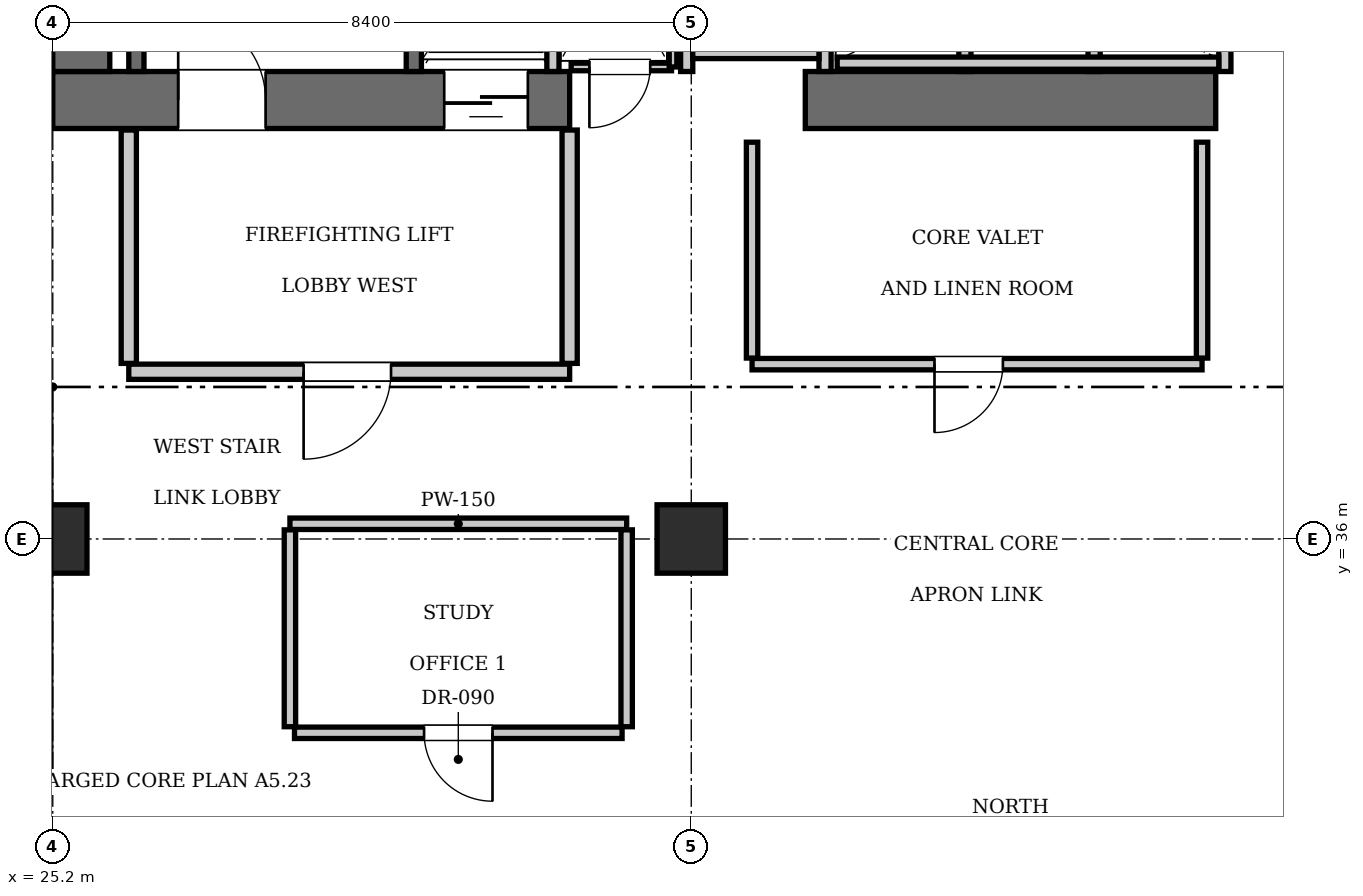
"""IFC4 building model, lengths in metres.
Left out: names, types, materials, properties, quantities, classifications, styles, units other than length and angle.
Written with IfcOpenShell. Run it as: python <this file> out.ifc"""

import sys

from ifc_helpers import new_model, si_unit, direction, frame, frame_2d, origin, origin_2d, place, context, subcontext, project, spatial, rectangle, extrude, element, fill, save


model = new_model("IFC4")
c1 = context("Model", 3, precision=1e-05, world=origin(), true_north=direction((0.0, 1.0)))
c2 = subcontext(c1, "Body", "Model", "MODEL_VIEW")
j1 = project(units=[si_unit("LENGTHUNIT", "METRE"), si_unit("PLANEANGLEUNIT", "RADIAN")], contexts=[c1])
p1 = place(None, origin())
s1 = spatial("IfcSite", under=j1, at=p1, CompositionType="ELEMENT")
p2 = place(p1, origin())
s2 = spatial("IfcBuilding", under=s1, at=p2, CompositionType="ELEMENT")
p3 = place(p2, frame((0.0, 0.0, 150.5)))
s3 = spatial("IfcBuildingStorey", under=s2, at=p3, CompositionType="ELEMENT", Elevation=150.5)
p4 = place(p3, frame((25.2, 41.775, 0.0), z_axis=(0.0, 0.0, 1.0), x_axis=(1.0, 0.0, 0.0)))
e1 = element("IfcWall", 1, at=p4, inside=s3, PredefinedType="SHEAR", context=c2, shape_type="SweptSolid", body=[
    extrude(rectangle(XDim=6.8, YDim=0.75, at=frame_2d((3.4, 0.0))), origin(), (0.0, 0.0, 1.0), 3.85),
])
p5 = place(p4, frame((1.65, 0.0, 0.0)))
e2 = element("IfcOpeningElement", 2, at=p5, cuts=e1, PredefinedType="OPENING", context=c2, shape_type="SweptSolid", body=[
    extrude(rectangle(XDim=1.15, YDim=2.15, at=frame_2d((0.575, 1.075))), frame((0.0, 0.385, 0.0), z_axis=(0.0, -1.0, 0.0), x_axis=(1.0, 0.0, 0.0)), (0.0, 0.0, 1.0), 0.77),
])
p6 = place(p4, frame((5.15, 0.0, 0.0)))
e3 = element("IfcOpeningElement", 3, at=p6, cuts=e1, PredefinedType="OPENING", context=c2, shape_type="SweptSolid", body=[
    extrude(rectangle(XDim=1.1, YDim=2.2, at=frame_2d((0.55, 1.1))), frame((0.0, 0.385, 0.0), z_axis=(0.0, -1.0, 0.0), x_axis=(1.0, 0.0, 0.0)), (0.0, 0.0, 1.0), 0.77),
])
p7 = place(p3, frame((35.1, 41.775, 0.0), z_axis=(0.0, 0.0, 1.0), x_axis=(1.0, 0.0, 0.0)))
e4 = element("IfcWall", 4, at=p7, inside=s3, PredefinedType="SHEAR", context=c2, shape_type="SweptSolid", body=[
    extrude(rectangle(XDim=5.4, YDim=0.75, at=frame_2d((2.7, 0.0))), origin(), (0.0, 0.0, 1.0), 3.85),
])
p8 = place(p3, frame((25.575, 42.15, 0.0), z_axis=(0.0, 0.0, 1.0), x_axis=(0.0, 1.0, 0.0)))
e5 = element("IfcWall", 5, at=p8, inside=s3, PredefinedType="SHEAR", context=c2, shape_type="SweptSolid", body=[
    extrude(rectangle(XDim=1.9, YDim=0.75, at=frame_2d((0.95, 0.0))), origin(), (0.0, 0.0, 1.0), 3.85),
])
for number, where, z_axis, x_axis in (
    (6, (25.2, 36.0, 0.0), (0.0, 0.0, 1.0), (1.0, 0.0, 0.0)),
    (7, (33.6, 36.0, 0.0), (0.0, 0.0, 1.0), (1.0, 0.0, 0.0)),
):
    element("IfcColumn", number, at=place(p3, frame(where, z_axis=z_axis, x_axis=x_axis)), inside=s3, PredefinedType="COLUMN", context=c2, shape_type="SweptSolid", body=[
        extrude(rectangle(XDim=0.9, YDim=0.9, at=origin_2d()), origin(), (0.0, 0.0, 1.0), 3.85),
    ])
p9 = place(p3, frame((29.95, 42.15, 0.0), z_axis=(0.0, 0.0, 1.0), x_axis=(0.0, 1.0, 0.0)))
e8 = element("IfcWall", 8, at=p9, inside=s3, PredefinedType="SOLIDWALL", context=c2, shape_type="SweptSolid", body=[
    extrude(rectangle(XDim=9.0, YDim=0.2, at=frame_2d((4.5, 0.0))), origin(), (0.0, 0.0, 1.0), 3.61),
])
p10 = place(p3, frame((26.3, 42.15, 0.0), z_axis=(0.0, 0.0, 1.0), x_axis=(0.0, 1.0, 0.0)))
e9 = element("IfcWall", 9, at=p10, inside=s3, PredefinedType="SOLIDWALL", context=c2, shape_type="SweptSolid", body=[
    extrude(rectangle(XDim=1.87, YDim=0.2, at=frame_2d((0.935, 0.0))), origin(), (0.0, 0.0, 1.0), 3.61),
])
p11 = place(p3, frame((31.78, 42.15, 0.0), z_axis=(0.0, 0.0, 1.0), x_axis=(0.0, 1.0, 0.0)))
e10 = element("IfcWall", 10, at=p11, inside=s3, PredefinedType="SOLIDWALL", context=c2, shape_type="SweptSolid", body=[
    extrude(rectangle(XDim=2.59, YDim=0.16, at=frame_2d((1.295, 0.0))), origin(), (0.0, 0.0, 1.0), 3.61),
])
for number, where, z_axis, x_axis in (
    (11, (37.2, 42.15, 0.0), (0.0, 0.0, 1.0), (0.0, 1.0, 0.0)),
    (12, (38.9, 42.15, 0.0), (0.0, 0.0, 1.0), (0.0, 1.0, 0.0)),
    (13, (40.62, 42.15, 0.0), (0.0, 0.0, 1.0), (0.0, 1.0, 0.0)),
):
    element("IfcWall", number, at=place(p3, frame(where, z_axis=z_axis, x_axis=x_axis)), inside=s3, PredefinedType="SOLIDWALL", context=c2, shape_type="SweptSolid", body=[
        extrude(rectangle(XDim=2.2, YDim=0.16, at=frame_2d((1.1, 0.0))), origin(), (0.0, 0.0, 1.0), 3.61),
    ])
p12 = place(p3, frame((35.52, 42.26, 0.0), z_axis=(0.0, 0.0, 1.0), x_axis=(1.0, 0.0, 0.0)))
e14 = element("IfcWall", 14, at=p12, inside=s3, PredefinedType="SOLIDWALL", context=c2, shape_type="SweptSolid", body=[
    extrude(rectangle(XDim=5.02, YDim=0.16, at=frame_2d((2.51, 0.0))), origin(), (0.0, 0.0, 1.0), 3.61),
])
for number, where, z_axis, x_axis in (
    (15, (33.54, 42.15, 0.0), (0.0, 0.0, 1.0), (0.0, 1.0, 0.0)),
    (16, (35.36, 42.15, 0.0), (0.0, 0.0, 1.0), (0.0, 1.0, 0.0)),
):
    element("IfcWall", number, at=place(p3, frame(where, z_axis=z_axis, x_axis=x_axis)), inside=s3, PredefinedType="SOLIDWALL", context=c2, shape_type="SweptSolid", body=[
        extrude(rectangle(XDim=2.25, YDim=0.16, at=frame_2d((1.125, 0.0))), origin(), (0.0, 0.0, 1.0), 3.61),
    ])
p13 = place(p3, frame((33.62, 42.4, 0.0), z_axis=(0.0, 0.0, 1.0), x_axis=(1.0, 0.0, 0.0)))
e17 = element("IfcWall", 17, at=p13, inside=s3, PredefinedType="SOLIDWALL", context=c2, shape_type="SweptSolid", body=[
    extrude(rectangle(XDim=1.66, YDim=0.16, at=frame_2d((0.83, 0.0))), origin(), (0.0, 0.0, 1.0), 3.61),
])
p14 = place(p3, frame((26.2, 38.2, 0.0), z_axis=(0.0, 0.0, 1.0), x_axis=(1.0, 0.0, 0.0)))
e18 = element("IfcWall", 18, at=p14, inside=s3, PredefinedType="PARTITIONING", context=c2, shape_type="SweptSolid", body=[
    extrude(rectangle(XDim=5.8, YDim=0.2, at=frame_2d((2.9, 0.0))), origin(), (0.0, 0.0, 1.0), 3.61),
])
p15 = place(p14, frame((2.3, 0.0, 0.0)))
e19 = element("IfcOpeningElement", 19, at=p15, cuts=e18, PredefinedType="OPENING", context=c2, shape_type="SweptSolid", body=[
    extrude(rectangle(XDim=1.15, YDim=2.15, at=frame_2d((0.575, 1.075))), frame((0.0, 0.11, 0.0), z_axis=(0.0, -1.0, 0.0), x_axis=(1.0, 0.0, 0.0)), (0.0, 0.0, 1.0), 0.22),
])
for number, where, z_axis, x_axis in (
    (20, (26.2, 38.31, 0.0), (0.0, 0.0, 1.0), (0.0, 1.0, 0.0)),
    (21, (32.0, 38.31, 0.0), (0.0, 0.0, 1.0), (0.0, 1.0, 0.0)),
):
    element("IfcWall", number, at=place(p3, frame(where, z_axis=z_axis, x_axis=x_axis)), inside=s3, PredefinedType="PARTITIONING", context=c2, shape_type="SweptSolid", body=[
        extrude(rectangle(XDim=3.07, YDim=0.2, at=frame_2d((1.535, 0.0))), origin(), (0.0, 0.0, 1.0), 3.61),
    ])
p16 = place(p3, frame((32.02, 42.21, 0.0), z_axis=(0.0, 0.0, 1.0), x_axis=(1.0, 0.0, 0.0)))
e22 = element("IfcWall", 22, at=p16, inside=s3, PredefinedType="PARTITIONING", context=c2, shape_type="SweptSolid", body=[
    extrude(rectangle(XDim=1.32, YDim=0.1, at=frame_2d((0.66, 0.0))), origin(), (0.0, 0.0, 1.0), 3.61),
])
p17 = place(p16, frame((0.24, 0.0, 0.0)))
e23 = element("IfcOpeningElement", 23, at=p17, cuts=e22, PredefinedType="OPENING", context=c2, shape_type="SweptSolid", body=[
    extrude(rectangle(XDim=0.8, YDim=2.05, at=frame_2d((0.4, 1.025))), frame((0.0, 0.06, 0.0), z_axis=(0.0, -1.0, 0.0), x_axis=(1.0, 0.0, 0.0)), (0.0, 0.0, 1.0), 0.12),
])
p18 = place(p3, frame((33.36, 42.21, 0.0), z_axis=(0.0, 0.0, 1.0), x_axis=(0.0, 1.0, 0.0)))
e24 = element("IfcWall", 24, at=p18, inside=s3, PredefinedType="PARTITIONING", context=c2, shape_type="SweptSolid", body=[
    extrude(rectangle(XDim=2.73, YDim=0.1, at=frame_2d((1.365, 0.0))), origin(), (0.0, 0.0, 1.0), 3.61),
])
p19 = place(p3, frame((34.4, 38.3, 0.0), z_axis=(0.0, 0.0, 1.0), x_axis=(1.0, 0.0, 0.0)))
e25 = element("IfcWall", 25, at=p19, inside=s3, PredefinedType="PARTITIONING", context=c2, shape_type="SweptSolid", body=[
    extrude(rectangle(XDim=5.92, YDim=0.15, at=frame_2d((2.96, 0.0))), origin(), (0.0, 0.0, 1.0), 3.61),
])
p20 = place(p19, frame((2.4, 0.0, 0.0)))
e26 = element("IfcOpeningElement", 26, at=p20, cuts=e25, PredefinedType="OPENING", context=c2, shape_type="SweptSolid", body=[
    extrude(rectangle(XDim=0.9, YDim=2.1, at=frame_2d((0.45, 1.05))), frame((0.0, 0.085, 0.0), z_axis=(0.0, -1.0, 0.0), x_axis=(1.0, 0.0, 0.0)), (0.0, 0.0, 1.0), 0.17),
])
for number, where, z_axis, x_axis in (
    (27, (34.4, 38.38, 0.0), (0.0, 0.0, 1.0), (0.0, 1.0, 0.0)),
    (28, (40.32, 38.38, 0.0), (0.0, 0.0, 1.0), (0.0, 1.0, 0.0)),
):
    element("IfcWall", number, at=place(p3, frame(where, z_axis=z_axis, x_axis=x_axis)), inside=s3, PredefinedType="PARTITIONING", context=c2, shape_type="SweptSolid", body=[
        extrude(rectangle(XDim=2.84, YDim=0.15, at=frame_2d((1.42, 0.0))), origin(), (0.0, 0.0, 1.0), 3.61),
    ])
p21 = place(p3, frame((28.32, 36.2, 0.0), z_axis=(0.0, 0.0, 1.0), x_axis=(1.0, 0.0, 0.0)))
e29 = element("IfcWall", 29, at=p21, inside=s3, PredefinedType="PARTITIONING", context=c2, shape_type="SweptSolid", body=[
    extrude(rectangle(XDim=4.43, YDim=0.15, at=frame_2d((2.215, 0.0))), origin(), (0.0, 0.0, 1.0), 3.61),
])
for number, where, z_axis, x_axis in (
    (30, (28.32, 33.53, 0.0), (0.0, 0.0, 1.0), (0.0, 1.0, 0.0)),
    (31, (32.75, 33.53, 0.0), (0.0, 0.0, 1.0), (0.0, 1.0, 0.0)),
):
    element("IfcWall", number, at=place(p3, frame(where, z_axis=z_axis, x_axis=x_axis)), inside=s3, PredefinedType="PARTITIONING", context=c2, shape_type="SweptSolid", body=[
        extrude(rectangle(XDim=2.59, YDim=0.15, at=frame_2d((1.295, 0.0))), origin(), (0.0, 0.0, 1.0), 3.61),
    ])
p22 = place(p3, frame((28.38, 33.45, 0.0), z_axis=(0.0, 0.0, 1.0), x_axis=(1.0, 0.0, 0.0)))
e32 = element("IfcWall", 32, at=p22, inside=s3, PredefinedType="PARTITIONING", context=c2, shape_type="SweptSolid", body=[
    extrude(rectangle(XDim=4.31, YDim=0.15, at=frame_2d((2.155, 0.0))), origin(), (0.0, 0.0, 1.0), 3.61),
])
p23 = place(p22, frame((1.705, 0.0, 0.0)))
e33 = element("IfcOpeningElement", 33, at=p23, cuts=e32, PredefinedType="OPENING", context=c2, shape_type="SweptSolid", body=[
    extrude(rectangle(XDim=0.9, YDim=2.1, at=frame_2d((0.45, 1.05))), frame((0.0, 0.085, 0.0), z_axis=(0.0, -1.0, 0.0), x_axis=(1.0, 0.0, 0.0)), (0.0, 0.0, 1.0), 0.17),
])
p24 = place(p5, origin())
e34 = element("IfcDoor", 34, at=p24, inside=s3, OperationType="SINGLE_SWING_LEFT", PredefinedType="DOOR", context=c2, shape_type="SweptSolid", body=[
    extrude(rectangle(XDim=1.15, YDim=2.15, at=frame_2d((0.575, 1.075))), frame((0.0, 0.025, 0.0), z_axis=(0.0, -1.0, 0.0), x_axis=(1.0, 0.0, 0.0)), (0.0, 0.0, 1.0), 0.05),
])
fill(e2, e34)
p25 = place(p6, frame((1.1, 0.0, 0.0), z_axis=(0.0, 0.0, 1.0), x_axis=(-1.0, 0.0, 0.0)))
e35 = element("IfcDoor", 35, at=p25, inside=s3, OperationType="SLIDING_TO_LEFT", PredefinedType="DOOR", context=c2, shape_type="SweptSolid", body=[
    extrude(rectangle(XDim=1.1, YDim=2.2, at=frame_2d((0.55, 1.1))), frame((0.0, 0.025, 0.0), z_axis=(0.0, -1.0, 0.0), x_axis=(1.0, 0.0, 0.0)), (0.0, 0.0, 1.0), 0.05),
])
fill(e3, e35)
p26 = place(p15, frame((1.15, 0.0, 0.0), z_axis=(0.0, 0.0, 1.0), x_axis=(-1.0, 0.0, 0.0)))
e36 = element("IfcDoor", 36, at=p26, inside=s3, OperationType="SINGLE_SWING_RIGHT", PredefinedType="DOOR", context=c2, shape_type="SweptSolid", body=[
    extrude(rectangle(XDim=1.15, YDim=2.15, at=frame_2d((0.575, 1.075))), frame((0.0, 0.025, 0.0), z_axis=(0.0, -1.0, 0.0), x_axis=(1.0, 0.0, 0.0)), (0.0, 0.0, 1.0), 0.05),
])
fill(e19, e36)
p27 = place(p17, frame((0.8, 0.0, 0.0), z_axis=(0.0, 0.0, 1.0), x_axis=(-1.0, 0.0, 0.0)))
e37 = element("IfcDoor", 37, at=p27, inside=s3, OperationType="SINGLE_SWING_RIGHT", PredefinedType="DOOR", context=c2, shape_type="SweptSolid", body=[
    extrude(rectangle(XDim=0.8, YDim=2.05, at=frame_2d((0.4, 1.025))), frame((0.0, 0.025, 0.0), z_axis=(0.0, -1.0, 0.0), x_axis=(1.0, 0.0, 0.0)), (0.0, 0.0, 1.0), 0.05),
])
fill(e23, e37)
p28 = place(p20, frame((0.9, 0.0, 0.0), z_axis=(0.0, 0.0, 1.0), x_axis=(-1.0, 0.0, 0.0)))
e38 = element("IfcDoor", 38, at=p28, inside=s3, OperationType="SINGLE_SWING_RIGHT", PredefinedType="DOOR", context=c2, shape_type="SweptSolid", body=[
    extrude(rectangle(XDim=0.9, YDim=2.1, at=frame_2d((0.45, 1.05))), frame((0.0, 0.025, 0.0), z_axis=(0.0, -1.0, 0.0), x_axis=(1.0, 0.0, 0.0)), (0.0, 0.0, 1.0), 0.05),
])
fill(e26, e38)
p29 = place(p23, frame((0.9, 0.0, 0.0), z_axis=(0.0, 0.0, 1.0), x_axis=(-1.0, 0.0, 0.0)))
e39 = element("IfcDoor", 39, at=p29, inside=s3, OperationType="SINGLE_SWING_LEFT", PredefinedType="DOOR", context=c2, shape_type="SweptSolid", body=[
    extrude(rectangle(XDim=0.9, YDim=2.1, at=frame_2d((0.45, 1.05))), frame((0.0, 0.025, 0.0), z_axis=(0.0, -1.0, 0.0), x_axis=(1.0, 0.0, 0.0)), (0.0, 0.0, 1.0), 0.05),
])
fill(e33, e39)
save(model, sys.argv[1])
